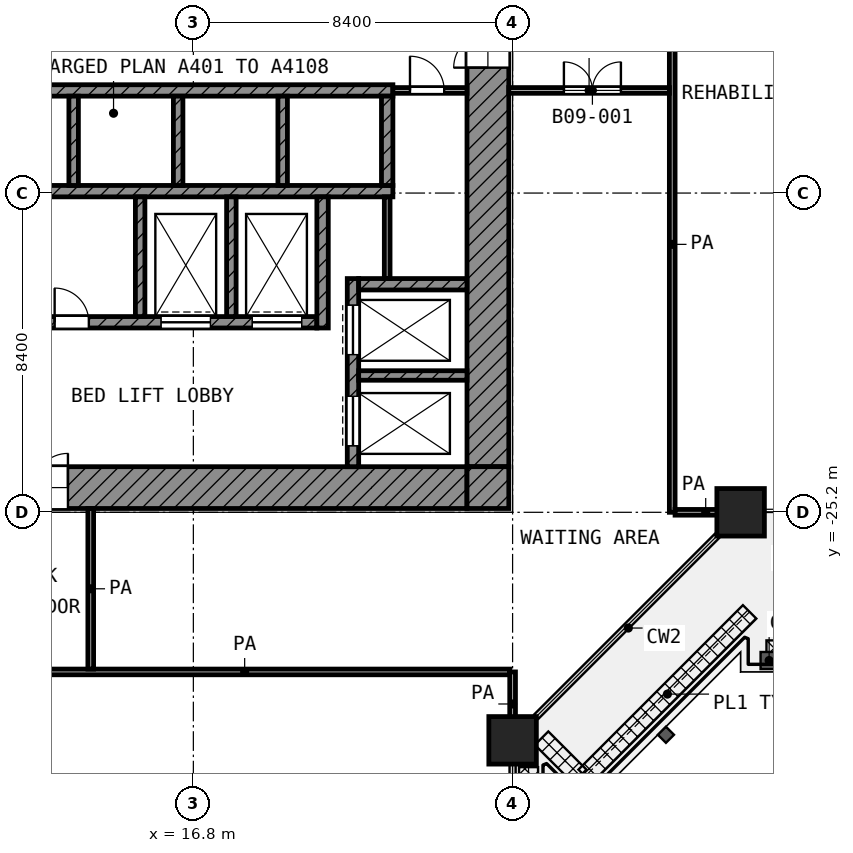
"""IFC4 building model, lengths in metres.
Left out: names, types, materials, properties, quantities, classifications, styles, units other than length and angle.
Written with IfcOpenShell. Run it as: python <this file> out.ifc"""

import sys

from ifc_helpers import new_model, si_unit, direction, frame, frame_2d, origin, origin_2d, place, context, subcontext, project, spatial, rectangle, extrude, element, fill, save


model = new_model("IFC4")
c1 = context("Model", 3, precision=1e-05, world=origin(), true_north=direction((0.0, 1.0)))
c2 = subcontext(c1, "Body", "Model", "MODEL_VIEW")
j1 = project(units=[si_unit("LENGTHUNIT", "METRE"), si_unit("PLANEANGLEUNIT", "RADIAN")], contexts=[c1])
p1 = place(None, origin())
s1 = spatial("IfcSite", under=j1, at=p1, CompositionType="ELEMENT")
p2 = place(p1, origin())
s2 = spatial("IfcBuilding", under=s1, at=p2, CompositionType="ELEMENT")
p3 = place(p2, frame((0.0, 0.0, 43.4)))
s3 = spatial("IfcBuildingStorey", under=s2, at=p3, CompositionType="ELEMENT", Elevation=43.4)
for number, where, z_axis, x_axis in (
    (1, (31.2, -25.2, 0.0), (0.0, 0.0, 1.0), (1.0, 0.0, 0.0)),
    (2, (25.2, -31.2, 0.0), (0.0, 0.0, 1.0), (1.0, 0.0, 0.0)),
):
    element("IfcColumn", number, at=place(p3, frame(where, z_axis=z_axis, x_axis=x_axis)), inside=s3, PredefinedType="COLUMN", context=c2, shape_type="SweptSolid", body=[
        extrude(rectangle(XDim=1.25, YDim=1.25, at=origin_2d()), origin(), (0.0, 0.0, 1.0), 4.2),
    ])
p4 = place(p3, frame((24.55, -24.0, 0.0), z_axis=(0.0, 0.0, 1.0), x_axis=(0.0, 1.0, 0.0)))
e3 = element("IfcWall", 3, at=p4, inside=s3, PredefinedType="SHEAR", context=c2, shape_type="SweptSolid", body=[
    extrude(rectangle(XDim=18.6, YDim=1.1, at=frame_2d((9.3, 0.0))), origin(), (0.0, 0.0, 1.0), 3.9),
])
p5 = place(p4, frame((10.5, 0.0, 0.0)))
e4 = element("IfcOpeningElement", 4, at=p5, cuts=e3, PredefinedType="OPENING", context=c2, shape_type="SweptSolid", body=[
    extrude(rectangle(XDim=1.8, YDim=2.1, at=frame_2d((0.9, 1.05))), frame((0.0, 0.56, 0.0), z_axis=(0.0, -1.0, 0.0), x_axis=(1.0, 0.0, 0.0)), (0.0, 0.0, 1.0), 1.12),
])
p6 = place(p3, frame((5.4, -24.55, 0.0), z_axis=(0.0, 0.0, 1.0), x_axis=(1.0, 0.0, 0.0)))
e5 = element("IfcWall", 5, at=p6, inside=s3, PredefinedType="SHEAR", context=c2, shape_type="SweptSolid", body=[
    extrude(rectangle(XDim=18.6, YDim=1.1, at=frame_2d((9.3, 0.0))), origin(), (0.0, 0.0, 1.0), 3.9),
])
p7 = place(p6, frame((6.3, 0.0, 0.0)))
e6 = element("IfcOpeningElement", 6, at=p7, cuts=e5, PredefinedType="OPENING", context=c2, shape_type="SweptSolid", body=[
    extrude(rectangle(XDim=1.8, YDim=2.1, at=frame_2d((0.9, 1.05))), frame((0.0, 0.56, 0.0), z_axis=(0.0, -1.0, 0.0), x_axis=(1.0, 0.0, 0.0)), (0.0, 0.0, 1.0), 1.12),
])
p8 = place(p3, frame((24.55, -25.1, 0.0), z_axis=(0.0, 0.0, 1.0), x_axis=(0.0, 1.0, 0.0)))
e7 = element("IfcWall", 7, at=p8, inside=s3, PredefinedType="SHEAR", context=c2, shape_type="SweptSolid", body=[
    extrude(rectangle(XDim=1.1, YDim=1.1, at=frame_2d((0.55, 0.0))), origin(), (0.0, 0.0, 1.0), 3.9),
])
for number, where, z_axis, x_axis in (
    (8, (5.4, -14.1, 0.0), (0.0, 0.0, 1.0), (1.0, 0.0, 0.0)),
    (9, (5.4, -16.75, 0.0), (0.0, 0.0, 1.0), (1.0, 0.0, 0.0)),
):
    element("IfcWall", number, at=place(p3, frame(where, z_axis=z_axis, x_axis=x_axis)), inside=s3, PredefinedType="SHEAR", context=c2, shape_type="SweptSolid", body=[
        extrude(rectangle(XDim=16.65, YDim=0.3, at=frame_2d((8.325, 0.0))), origin(), (0.0, 0.0, 1.0), 3.9),
    ])
p9 = place(p3, frame((5.4, -20.2, 0.0), z_axis=(0.0, 0.0, 1.0), x_axis=(1.0, 0.0, 0.0)))
e10 = element("IfcWall", 10, at=p9, inside=s3, PredefinedType="SHEAR", context=c2, shape_type="SweptSolid", body=[
    extrude(rectangle(XDim=14.65, YDim=0.3, at=frame_2d((7.325, 0.0))), origin(), (0.0, 0.0, 1.0), 3.9),
])
p10 = place(p9, frame((10.55, 0.0, 0.0)))
e11 = element("IfcOpeningElement", 11, at=p10, cuts=e10, PredefinedType="OPENING", context=c2, shape_type="SweptSolid", body=[
    extrude(rectangle(XDim=1.3, YDim=2.1, at=frame_2d((0.65, 1.05))), frame((0.0, 0.16, 0.0), z_axis=(0.0, -1.0, 0.0), x_axis=(1.0, 0.0, 0.0)), (0.0, 0.0, 1.0), 0.32),
])
p11 = place(p9, frame((12.95, 0.0, 0.0)))
e12 = element("IfcOpeningElement", 12, at=p11, cuts=e10, PredefinedType="OPENING", context=c2, shape_type="SweptSolid", body=[
    extrude(rectangle(XDim=1.3, YDim=2.1, at=frame_2d((0.65, 1.05))), frame((0.0, 0.16, 0.0), z_axis=(0.0, -1.0, 0.0), x_axis=(1.0, 0.0, 0.0)), (0.0, 0.0, 1.0), 0.32),
])
p12 = place(p9, frame((0.55, 0.0, 0.0)))
e13 = element("IfcOpeningElement", 13, at=p12, cuts=e10, PredefinedType="OPENING", context=c2, shape_type="SweptSolid", body=[
    extrude(rectangle(XDim=1.3, YDim=2.1, at=frame_2d((0.65, 1.05))), frame((0.0, 0.16, 0.0), z_axis=(0.0, -1.0, 0.0), x_axis=(1.0, 0.0, 0.0)), (0.0, 0.0, 1.0), 0.32),
])
p13 = place(p9, frame((2.95, 0.0, 0.0)))
e14 = element("IfcOpeningElement", 14, at=p13, cuts=e10, PredefinedType="OPENING", context=c2, shape_type="SweptSolid", body=[
    extrude(rectangle(XDim=1.3, YDim=2.1, at=frame_2d((0.65, 1.05))), frame((0.0, 0.16, 0.0), z_axis=(0.0, -1.0, 0.0), x_axis=(1.0, 0.0, 0.0)), (0.0, 0.0, 1.0), 0.32),
])
p14 = place(p9, frame((5.35, 0.0, 0.0)))
e15 = element("IfcOpeningElement", 15, at=p14, cuts=e10, PredefinedType="OPENING", context=c2, shape_type="SweptSolid", body=[
    extrude(rectangle(XDim=0.9, YDim=2.1, at=frame_2d((0.45, 1.05))), frame((0.0, 0.16, 0.0), z_axis=(0.0, -1.0, 0.0), x_axis=(1.0, 0.0, 0.0)), (0.0, 0.0, 1.0), 0.32),
])
p15 = place(p9, frame((7.75, 0.0, 0.0)))
e16 = element("IfcOpeningElement", 16, at=p15, cuts=e10, PredefinedType="OPENING", context=c2, shape_type="SweptSolid", body=[
    extrude(rectangle(XDim=0.9, YDim=2.1, at=frame_2d((0.45, 1.05))), frame((0.0, 0.16, 0.0), z_axis=(0.0, -1.0, 0.0), x_axis=(1.0, 0.0, 0.0)), (0.0, 0.0, 1.0), 0.32),
])
p16 = place(p3, frame((20.2, -20.35, 0.0), z_axis=(0.0, 0.0, 1.0), x_axis=(0.0, 1.0, 0.0)))
e17 = element("IfcWall", 17, at=p16, inside=s3, PredefinedType="SHEAR", context=c2, shape_type="SweptSolid", body=[
    extrude(rectangle(XDim=3.45, YDim=0.3, at=frame_2d((1.725, 0.0))), origin(), (0.0, 0.0, 1.0), 3.9),
])
p17 = place(p3, frame((21.9, -16.6, 0.0), z_axis=(0.0, 0.0, 1.0), x_axis=(0.0, 1.0, 0.0)))
e18 = element("IfcWall", 18, at=p17, inside=s3, PredefinedType="SHEAR", context=c2, shape_type="SweptSolid", body=[
    extrude(rectangle(XDim=2.35, YDim=0.3, at=frame_2d((1.175, 0.0))), origin(), (0.0, 0.0, 1.0), 3.9),
])
p18 = place(p3, frame((21.15, -19.2, 0.0), z_axis=(0.0, 0.0, 1.0), x_axis=(1.0, 0.0, 0.0)))
e19 = element("IfcWall", 19, at=p18, inside=s3, PredefinedType="SHEAR", context=c2, shape_type="SweptSolid", body=[
    extrude(rectangle(XDim=2.85, YDim=0.3, at=frame_2d((1.425, 0.0))), origin(), (0.0, 0.0, 1.0), 3.9),
])
p19 = place(p3, frame((21.0, -24.0, 0.0), z_axis=(0.0, 0.0, 1.0), x_axis=(0.0, 1.0, 0.0)))
e20 = element("IfcWall", 20, at=p19, inside=s3, PredefinedType="SHEAR", context=c2, shape_type="SweptSolid", body=[
    extrude(rectangle(XDim=4.95, YDim=0.3, at=frame_2d((2.475, 0.0))), origin(), (0.0, 0.0, 1.0), 3.9),
])
p20 = place(p19, frame((2.95, 0.0, 0.0)))
e21 = element("IfcOpeningElement", 21, at=p20, cuts=e20, PredefinedType="OPENING", context=c2, shape_type="SweptSolid", body=[
    extrude(rectangle(XDim=1.3, YDim=2.1, at=frame_2d((0.65, 1.05))), frame((0.0, 0.16, 0.0), z_axis=(0.0, -1.0, 0.0), x_axis=(1.0, 0.0, 0.0)), (0.0, 0.0, 1.0), 0.32),
])
p21 = place(p19, frame((0.55, 0.0, 0.0)))
e22 = element("IfcOpeningElement", 22, at=p21, cuts=e20, PredefinedType="OPENING", context=c2, shape_type="SweptSolid", body=[
    extrude(rectangle(XDim=1.3, YDim=2.1, at=frame_2d((0.65, 1.05))), frame((0.0, 0.16, 0.0), z_axis=(0.0, -1.0, 0.0), x_axis=(1.0, 0.0, 0.0)), (0.0, 0.0, 1.0), 0.32),
])
p22 = place(p3, frame((21.15, -21.6, 0.0), z_axis=(0.0, 0.0, 1.0), x_axis=(1.0, 0.0, 0.0)))
e23 = element("IfcWall", 23, at=p22, inside=s3, PredefinedType="SHEAR", context=c2, shape_type="SweptSolid", body=[
    extrude(rectangle(XDim=2.85, YDim=0.25, at=frame_2d((1.425, 0.0))), origin(), (0.0, 0.0, 1.0), 3.9),
])
for number, where, z_axis, x_axis in (
    (24, (15.4, -20.05, 0.0), (0.0, 0.0, 1.0), (0.0, 1.0, 0.0)),
    (25, (17.8, -20.05, 0.0), (0.0, 0.0, 1.0), (0.0, 1.0, 0.0)),
):
    element("IfcWall", number, at=place(p3, frame(where, z_axis=z_axis, x_axis=x_axis)), inside=s3, PredefinedType="SHEAR", context=c2, shape_type="SweptSolid", body=[
        extrude(rectangle(XDim=3.15, YDim=0.25, at=frame_2d((1.575, 0.0))), origin(), (0.0, 0.0, 1.0), 3.9),
    ])
for number, where, z_axis, x_axis in (
    (26, (13.65, -16.6, 0.0), (0.0, 0.0, 1.0), (0.0, 1.0, 0.0)),
    (27, (16.4, -16.6, 0.0), (0.0, 0.0, 1.0), (0.0, 1.0, 0.0)),
    (28, (19.15, -16.6, 0.0), (0.0, 0.0, 1.0), (0.0, 1.0, 0.0)),
):
    element("IfcWall", number, at=place(p3, frame(where, z_axis=z_axis, x_axis=x_axis)), inside=s3, PredefinedType="SHEAR", context=c2, shape_type="SweptSolid", body=[
        extrude(rectangle(XDim=2.35, YDim=0.25, at=frame_2d((1.175, 0.0))), origin(), (0.0, 0.0, 1.0), 3.9),
    ])
p23 = place(p3, frame((21.9, -19.05, 0.0), z_axis=(0.0, 0.0, 1.0), x_axis=(0.0, 1.0, 0.0)))
e29 = element("IfcWall", 29, at=p23, inside=s3, PredefinedType="PARTITIONING", context=c2, shape_type="SweptSolid", body=[
    extrude(rectangle(XDim=2.15, YDim=0.15, at=frame_2d((1.075, 0.0))), origin(), (0.0, 0.0, 1.0), 3.9),
])
p24 = place(p3, frame((22.05, -14.1, 0.0), z_axis=(0.0, 0.0, 1.0), x_axis=(1.0, 0.0, 0.0)))
e30 = element("IfcWall", 30, at=p24, inside=s3, PredefinedType="PARTITIONING", context=c2, shape_type="SweptSolid", body=[
    extrude(rectangle(XDim=1.95, YDim=0.15, at=frame_2d((0.975, 0.0))), origin(), (0.0, 0.0, 1.0), 3.9),
])
p25 = place(p24, frame((0.45, 0.0, 0.0)))
e31 = element("IfcOpeningElement", 31, at=p25, cuts=e30, PredefinedType="OPENING", context=c2, shape_type="SweptSolid", body=[
    extrude(rectangle(XDim=0.9, YDim=2.1, at=frame_2d((0.45, 1.05))), frame((0.0, 0.085, 0.0), z_axis=(0.0, -1.0, 0.0), x_axis=(1.0, 0.0, 0.0)), (0.0, 0.0, 1.0), 0.17),
])
p26 = place(p3, frame((11.175, -29.4, 0.0), z_axis=(0.0, 0.0, 1.0), x_axis=(1.0, 0.0, 0.0)))
e32 = element("IfcWall", 32, at=p26, inside=s3, PredefinedType="PARTITIONING", context=c2, shape_type="SweptSolid", body=[
    extrude(rectangle(XDim=13.95, YDim=0.15, at=frame_2d((6.975, 0.0))), origin(), (0.0, 0.0, 1.0), 3.9),
])
p27 = place(p3, frame((29.475, -25.2, 0.0), z_axis=(0.0, 0.0, 1.0), x_axis=(1.0, 0.0, 0.0)))
e33 = element("IfcWall", 33, at=p27, inside=s3, PredefinedType="PARTITIONING", context=c2, shape_type="SweptSolid", body=[
    extrude(rectangle(XDim=1.612, YDim=0.15, at=frame_2d((0.806, 0.0))), origin(), (0.0, 0.0, 1.0), 3.9),
])
p28 = place(p3, frame((25.1, -14.1, 0.0), z_axis=(0.0, 0.0, 1.0), x_axis=(1.0, 0.0, 0.0)))
e34 = element("IfcWall", 34, at=p28, inside=s3, PredefinedType="PARTITIONING", context=c2, shape_type="SweptSolid", body=[
    extrude(rectangle(XDim=4.225, YDim=0.15, at=frame_2d((2.112, 0.0))), origin(), (0.0, 0.0, 1.0), 3.9),
])
p29 = place(p28, frame((1.45, 0.0, 0.0)))
e35 = element("IfcOpeningElement", 35, at=p29, cuts=e34, PredefinedType="OPENING", context=c2, shape_type="SweptSolid", body=[
    extrude(rectangle(XDim=1.5, YDim=2.1, at=frame_2d((0.75, 1.05))), frame((0.0, 0.085, 0.0), z_axis=(0.0, -1.0, 0.0), x_axis=(1.0, 0.0, 0.0)), (0.0, 0.0, 1.0), 0.17),
])
p30 = place(p3, frame((14.1, -29.325, 0.0), z_axis=(0.0, 0.0, 1.0), x_axis=(0.0, 1.0, 0.0)))
e36 = element("IfcWall", 36, at=p30, inside=s3, PredefinedType="PARTITIONING", context=c2, shape_type="SweptSolid", body=[
    extrude(rectangle(XDim=4.225, YDim=0.15, at=frame_2d((2.112, 0.0))), origin(), (0.0, 0.0, 1.0), 3.9),
])
p31 = place(p3, frame((25.2, -31.087, 0.0), z_axis=(0.0, 0.0, 1.0), x_axis=(0.0, 1.0, 0.0)))
e37 = element("IfcWall", 37, at=p31, inside=s3, PredefinedType="PARTITIONING", context=c2, shape_type="SweptSolid", body=[
    extrude(rectangle(XDim=1.687, YDim=0.15, at=frame_2d((0.844, 0.0))), origin(), (0.0, 0.0, 1.0), 3.9),
])
p32 = place(p3, frame((29.4, -25.2, 0.0), z_axis=(0.0, 0.0, 1.0), x_axis=(0.0, 1.0, 0.0)))
e38 = element("IfcWall", 38, at=p32, inside=s3, PredefinedType="PARTITIONING", context=c2, shape_type="SweptSolid", body=[
    extrude(rectangle(XDim=14.1, YDim=0.15, at=frame_2d((7.05, 0.0))), origin(), (0.0, 0.0, 1.0), 3.9),
])
p33 = place(p20, origin())
e39 = element("IfcDoor", 39, at=p33, inside=s3, OperationType="DOUBLE_DOOR_SLIDING", PredefinedType="DOOR", context=c2, shape_type="SweptSolid", body=[
    extrude(rectangle(XDim=1.3, YDim=2.1, at=frame_2d((0.65, 1.05))), frame((0.0, 0.025, 0.0), z_axis=(0.0, -1.0, 0.0), x_axis=(1.0, 0.0, 0.0)), (0.0, 0.0, 1.0), 0.05),
])
fill(e21, e39)
p34 = place(p21, origin())
e40 = element("IfcDoor", 40, at=p34, inside=s3, OperationType="DOUBLE_DOOR_SLIDING", PredefinedType="DOOR", context=c2, shape_type="SweptSolid", body=[
    extrude(rectangle(XDim=1.3, YDim=2.1, at=frame_2d((0.65, 1.05))), frame((0.0, 0.025, 0.0), z_axis=(0.0, -1.0, 0.0), x_axis=(1.0, 0.0, 0.0)), (0.0, 0.0, 1.0), 0.05),
])
fill(e22, e40)
p35 = place(p10, origin())
e41 = element("IfcDoor", 41, at=p35, inside=s3, OperationType="DOUBLE_DOOR_SLIDING", PredefinedType="DOOR", context=c2, shape_type="SweptSolid", body=[
    extrude(rectangle(XDim=1.3, YDim=2.1, at=frame_2d((0.65, 1.05))), frame((0.0, 0.025, 0.0), z_axis=(0.0, -1.0, 0.0), x_axis=(1.0, 0.0, 0.0)), (0.0, 0.0, 1.0), 0.05),
])
fill(e11, e41)
p36 = place(p11, origin())
e42 = element("IfcDoor", 42, at=p36, inside=s3, OperationType="DOUBLE_DOOR_SLIDING", PredefinedType="DOOR", context=c2, shape_type="SweptSolid", body=[
    extrude(rectangle(XDim=1.3, YDim=2.1, at=frame_2d((0.65, 1.05))), frame((0.0, 0.025, 0.0), z_axis=(0.0, -1.0, 0.0), x_axis=(1.0, 0.0, 0.0)), (0.0, 0.0, 1.0), 0.05),
])
fill(e12, e42)
p37 = place(p5, origin())
e43 = element("IfcDoor", 43, at=p37, inside=s3, OperationType="DOUBLE_DOOR_SINGLE_SWING", PredefinedType="DOOR", context=c2, shape_type="SweptSolid", body=[
    extrude(rectangle(XDim=1.8, YDim=2.1, at=frame_2d((0.9, 1.05))), frame((0.0, 0.025, 0.0), z_axis=(0.0, -1.0, 0.0), x_axis=(1.0, 0.0, 0.0)), (0.0, 0.0, 1.0), 0.05),
])
fill(e4, e43)
p38 = place(p7, origin())
e44 = element("IfcDoor", 44, at=p38, inside=s3, OperationType="DOUBLE_DOOR_SINGLE_SWING", PredefinedType="DOOR", context=c2, shape_type="SweptSolid", body=[
    extrude(rectangle(XDim=1.8, YDim=2.1, at=frame_2d((0.9, 1.05))), frame((0.0, 0.025, 0.0), z_axis=(0.0, -1.0, 0.0), x_axis=(1.0, 0.0, 0.0)), (0.0, 0.0, 1.0), 0.05),
])
fill(e6, e44)
p39 = place(p25, origin())
e45 = element("IfcDoor", 45, at=p39, inside=s3, OperationType="SINGLE_SWING_LEFT", PredefinedType="DOOR", context=c2, shape_type="SweptSolid", body=[
    extrude(rectangle(XDim=0.9, YDim=2.1, at=frame_2d((0.45, 1.05))), frame((0.0, 0.025, 0.0), z_axis=(0.0, -1.0, 0.0), x_axis=(1.0, 0.0, 0.0)), (0.0, 0.0, 1.0), 0.05),
])
fill(e31, e45)
p40 = place(p15, origin())
e46 = element("IfcDoor", 46, at=p40, inside=s3, OperationType="SINGLE_SWING_LEFT", PredefinedType="DOOR", context=c2, shape_type="SweptSolid", body=[
    extrude(rectangle(XDim=0.9, YDim=2.1, at=frame_2d((0.45, 1.05))), frame((0.0, 0.025, 0.0), z_axis=(0.0, -1.0, 0.0), x_axis=(1.0, 0.0, 0.0)), (0.0, 0.0, 1.0), 0.05),
])
fill(e16, e46)
p41 = place(p29, origin())
e47 = element("IfcDoor", 47, at=p41, inside=s3, OperationType="DOUBLE_DOOR_SINGLE_SWING", PredefinedType="DOOR", context=c2, shape_type="SweptSolid", body=[
    extrude(rectangle(XDim=1.5, YDim=2.1, at=frame_2d((0.75, 1.05))), frame((0.0, 0.025, 0.0), z_axis=(0.0, -1.0, 0.0), x_axis=(1.0, 0.0, 0.0)), (0.0, 0.0, 1.0), 0.05),
])
fill(e35, e47)
save(model, sys.argv[1])
